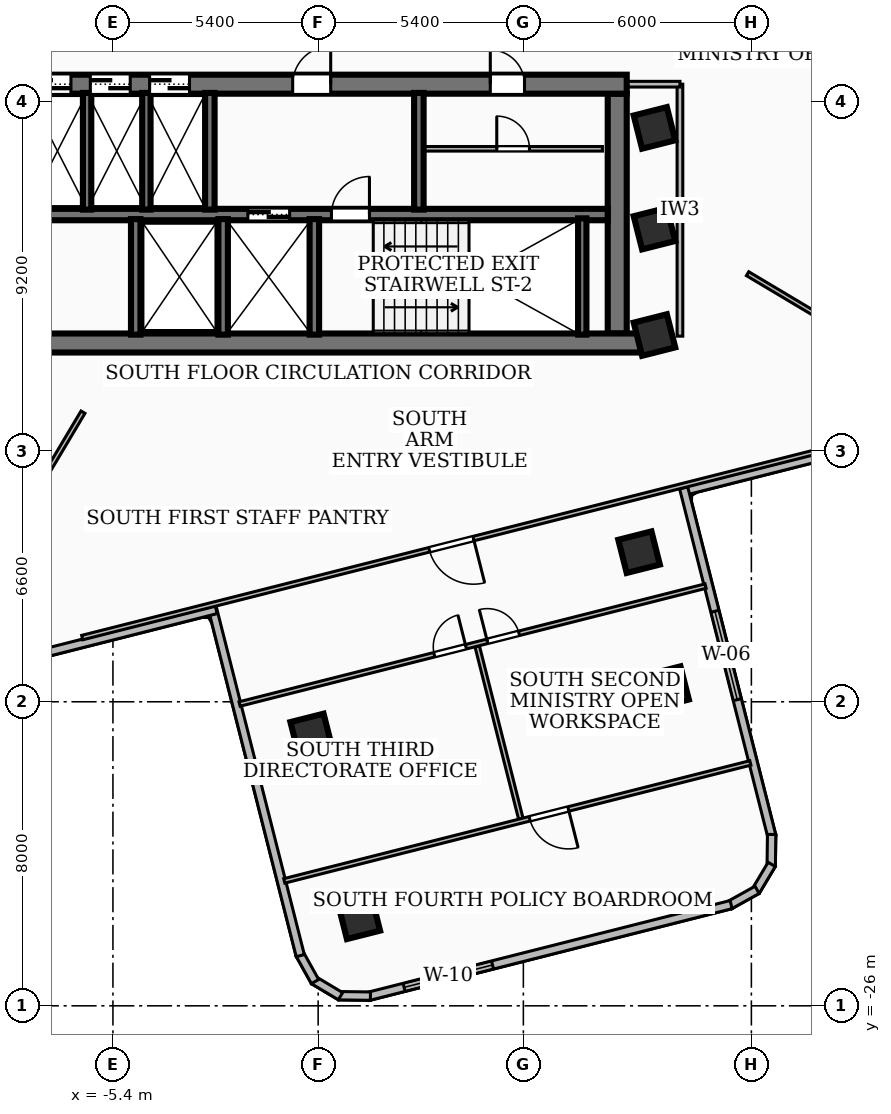
"""IFC4 building model, lengths in metres.
Left out: names, types, materials, properties, quantities, classifications, styles, units other than length and angle.
Written with IfcOpenShell. Run it as: python <this file> out.ifc"""

import sys

from ifc_helpers import new_model, si_unit, direction, frame, frame_2d, origin, origin_2d, place, context, subcontext, project, spatial, rectangle, extrude, element, fill, save


model = new_model("IFC4")
c1 = context("Model", 3, precision=1e-05, world=origin(), true_north=direction((0.0, 1.0)))
c2 = subcontext(c1, "Body", "Model", "MODEL_VIEW")
j1 = project(units=[si_unit("LENGTHUNIT", "METRE"), si_unit("PLANEANGLEUNIT", "RADIAN")], contexts=[c1])
p1 = place(None, origin())
s1 = spatial("IfcSite", under=j1, at=p1, CompositionType="ELEMENT")
p2 = place(p1, origin())
s2 = spatial("IfcBuilding", under=s1, at=p2, CompositionType="ELEMENT")
p3 = place(p2, frame((0.0, 0.0, 130.68)))
s3 = spatial("IfcBuildingStorey", under=s2, at=p3, CompositionType="ELEMENT", Elevation=130.68)
p4 = place(p3, frame((8.78, -8.56, 0.0), z_axis=(0.0, 0.0, 1.0), x_axis=(-1.0, 0.0, 0.0)))
e1 = element("IfcWall", 1, at=p4, inside=s3, PredefinedType="SHEAR", context=c2, shape_type="SweptSolid", body=[
    extrude(rectangle(XDim=17.56, YDim=0.5, at=frame_2d((8.78, 0.0))), origin(), (0.0, 0.0, 1.0), 3.32),
])
p5 = place(p3, frame((-8.12, -1.75, 0.0), z_axis=(0.0, 0.0, 1.0), x_axis=(1.0, 0.0, 0.0)))
e2 = element("IfcWall", 2, at=p5, inside=s3, PredefinedType="SHEAR", context=c2, shape_type="SweptSolid", body=[
    extrude(rectangle(XDim=16.24, YDim=0.5, at=frame_2d((8.12, 0.0))), origin(), (0.0, 0.0, 1.0), 3.32),
])
p6 = place(p5, frame((7.45, 0.0, 0.0)))
e3 = element("IfcOpeningElement", 3, at=p6, cuts=e2, PredefinedType="OPENING", context=c2, shape_type="SweptSolid", body=[
    extrude(rectangle(XDim=1.0, YDim=2.1, at=frame_2d((0.5, 1.05))), frame((0.0, 0.26, 0.0), z_axis=(0.0, -1.0, 0.0), x_axis=(1.0, 0.0, 0.0)), (0.0, 0.0, 1.0), 0.52),
])
p7 = place(p5, frame((12.65, 0.0, 0.0)))
e4 = element("IfcOpeningElement", 4, at=p7, cuts=e2, PredefinedType="OPENING", context=c2, shape_type="SweptSolid", body=[
    extrude(rectangle(XDim=0.9, YDim=2.06, at=frame_2d((0.45, 1.03))), frame((0.0, 0.26, 0.0), z_axis=(0.0, -1.0, 0.0), x_axis=(1.0, 0.0, 0.0)), (0.0, 0.0, 1.0), 0.52),
])
p8 = place(p5, frame((0.565, 0.0, 0.0)))
e5 = element("IfcOpeningElement", 5, at=p8, cuts=e2, PredefinedType="OPENING", context=c2, shape_type="SweptSolid", body=[
    extrude(rectangle(XDim=1.05, YDim=2.15, at=frame_2d((0.525, 1.075))), frame((0.0, 0.26, 0.0), z_axis=(0.0, -1.0, 0.0), x_axis=(1.0, 0.0, 0.0)), (0.0, 0.0, 1.0), 0.52),
])
p9 = place(p5, frame((2.125, 0.0, 0.0)))
e6 = element("IfcOpeningElement", 6, at=p9, cuts=e2, PredefinedType="OPENING", context=c2, shape_type="SweptSolid", body=[
    extrude(rectangle(XDim=1.05, YDim=2.15, at=frame_2d((0.525, 1.075))), frame((0.0, 0.26, 0.0), z_axis=(0.0, -1.0, 0.0), x_axis=(1.0, 0.0, 0.0)), (0.0, 0.0, 1.0), 0.52),
])
p10 = place(p5, frame((3.685, 0.0, 0.0)))
e7 = element("IfcOpeningElement", 7, at=p10, cuts=e2, PredefinedType="OPENING", context=c2, shape_type="SweptSolid", body=[
    extrude(rectangle(XDim=1.05, YDim=2.15, at=frame_2d((0.525, 1.075))), frame((0.0, 0.26, 0.0), z_axis=(0.0, -1.0, 0.0), x_axis=(1.0, 0.0, 0.0)), (0.0, 0.0, 1.0), 0.52),
])
p11 = place(p3, frame((7.87, -2.0, 0.0), z_axis=(0.0, 0.0, 1.0), x_axis=(0.0, -1.0, 0.0)))
e8 = element("IfcWall", 8, at=p11, inside=s3, PredefinedType="SHEAR", context=c2, shape_type="SweptSolid", body=[
    extrude(rectangle(XDim=6.31, YDim=0.5, at=frame_2d((3.155, 0.0))), origin(), (0.0, 0.0, 1.0), 3.32),
])
p12 = place(p3, frame((-7.62, -5.18, 0.0), z_axis=(0.0, 0.0, 1.0), x_axis=(1.0, 0.0, 0.0)))
e9 = element("IfcWall", 9, at=p12, inside=s3, PredefinedType="SOLIDWALL", context=c2, shape_type="SweptSolid", body=[
    extrude(rectangle(XDim=15.24, YDim=0.3, at=frame_2d((7.62, 0.0))), origin(), (0.0, 0.0, 1.0), 3.32),
])
p13 = place(p12, frame((5.77, 0.0, 0.0)))
e10 = element("IfcOpeningElement", 10, at=p13, cuts=e9, PredefinedType="OPENING", context=c2, shape_type="SweptSolid", body=[
    extrude(rectangle(XDim=1.1, YDim=2.15, at=frame_2d((0.55, 1.075))), frame((0.0, 0.16, 0.0), z_axis=(0.0, -1.0, 0.0), x_axis=(1.0, 0.0, 0.0)), (0.0, 0.0, 1.0), 0.32),
])
p14 = place(p12, frame((7.97, 0.0, 0.0)))
e11 = element("IfcOpeningElement", 11, at=p14, cuts=e9, PredefinedType="OPENING", context=c2, shape_type="SweptSolid", body=[
    extrude(rectangle(XDim=1.0, YDim=2.1, at=frame_2d((0.5, 1.05))), frame((0.0, 0.16, 0.0), z_axis=(0.0, -1.0, 0.0), x_axis=(1.0, 0.0, 0.0)), (0.0, 0.0, 1.0), 0.32),
])
p15 = place(p3, frame((6.95, -8.34, 0.0), z_axis=(0.0, 0.0, 1.0), x_axis=(0.0, 1.0, 0.0)))
e12 = element("IfcWall", 12, at=p15, inside=s3, PredefinedType="SOLIDWALL", context=c2, shape_type="SweptSolid", body=[
    extrude(rectangle(XDim=3.06, YDim=0.22, at=frame_2d((1.53, 0.0))), origin(), (0.0, 0.0, 1.0), 3.32),
])
for number, where, z_axis, x_axis in (
    (13, (-0.1, -8.34, 0.0), (0.0, 0.0, 1.0), (0.0, 1.0, 0.0)),
    (14, (-2.5, -8.34, 0.0), (0.0, 0.0, 1.0), (0.0, 1.0, 0.0)),
    (15, (-4.8, -8.34, 0.0), (0.0, 0.0, 1.0), (0.0, 1.0, 0.0)),
):
    element("IfcWall", number, at=place(p3, frame(where, z_axis=z_axis, x_axis=x_axis)), inside=s3, PredefinedType="SOLIDWALL", context=c2, shape_type="SweptSolid", body=[
        extrude(rectangle(XDim=3.04, YDim=0.25, at=frame_2d((1.52, 0.0))), origin(), (0.0, 0.0, 1.0), 3.32),
    ])
for number, where, z_axis, x_axis in (
    (16, (-2.85, -5.05, 0.0), (0.0, 0.0, 1.0), (0.0, 1.0, 0.0)),
    (17, (2.65, -5.05, 0.0), (0.0, 0.0, 1.0), (0.0, 1.0, 0.0)),
):
    element("IfcWall", number, at=place(p3, frame(where, z_axis=z_axis, x_axis=x_axis)), inside=s3, PredefinedType="SOLIDWALL", context=c2, shape_type="SweptSolid", body=[
        extrude(rectangle(XDim=3.07, YDim=0.25, at=frame_2d((1.535, 0.0))), origin(), (0.0, 0.0, 1.0), 3.32),
    ])
for number, where, z_axis, x_axis in (
    (18, (-6.08, -5.05, 0.0), (0.0, 0.0, 1.0), (0.0, 1.0, 0.0)),
    (19, (-4.52, -5.05, 0.0), (0.0, 0.0, 1.0), (0.0, 1.0, 0.0)),
):
    element("IfcWall", number, at=place(p3, frame(where, z_axis=z_axis, x_axis=x_axis)), inside=s3, PredefinedType="SOLIDWALL", context=c2, shape_type="SweptSolid", body=[
        extrude(rectangle(XDim=3.07, YDim=0.22, at=frame_2d((1.535, 0.0))), origin(), (0.0, 0.0, 1.0), 3.32),
    ])
for number, where, z_axis, x_axis in (
    (20, (8.85, -5.55, 0.0), (0.0, 0.0, 1.0), (0.969, 0.245, 0.0)),
    (21, (8.85, -2.9, 0.0), (0.0, 0.0, 1.0), (0.969, 0.245, 0.0)),
    (22, (8.85, -8.35, 0.0), (0.0, 0.0, 1.0), (0.969, 0.245, 0.0)),
    (23, (-0.183, -18.86, 0.0), (0.0, 0.0, 1.0), (0.969, 0.245, 0.0)),
    (24, (8.445, -14.064, 0.0), (0.0, 0.0, 1.0), (0.969, 0.245, 0.0)),
    (25, (1.083, -23.697, 0.0), (0.0, 0.0, 1.0), (0.969, 0.245, 0.0)),
    (26, (9.208, -17.615, 0.0), (0.0, 0.0, 1.0), (0.969, 0.245, 0.0)),
):
    element("IfcColumn", number, at=place(p3, frame(where, z_axis=z_axis, x_axis=x_axis)), inside=s3, PredefinedType="COLUMN", context=c2, shape_type="SweptSolid", body=[
        extrude(rectangle(XDim=0.9, YDim=0.9, at=origin_2d()), origin(), (0.0, 0.0, 1.0), 3.6),
    ])
p16 = place(p3, frame((16.107, -10.82, 0.0), z_axis=(0.0, 0.0, 1.0), x_axis=(-0.969443674581, -0.245314006561, 0.0)))
e27 = element("IfcWall", 27, at=p16, inside=s3, PredefinedType="SOLIDWALL", context=c2, shape_type="SweptSolid", body=[
    extrude(rectangle(XDim=6.759, YDim=0.22, at=frame_2d((3.379, 0.0))), origin(), (0.0, 0.0, 1.0), 3.32),
])
p17 = place(p3, frame((9.618, -12.371, 0.0), z_axis=(0.0, 0.0, 1.0), x_axis=(0.245401293719, -0.969421582719, 0.0)))
e28 = element("IfcWall", 28, at=p17, inside=s3, PredefinedType="SOLIDWALL", context=c2, shape_type="SweptSolid", body=[
    extrude(rectangle(XDim=9.458, YDim=0.22, at=frame_2d((4.729, 0.0))), origin(), (0.0, 0.0, 1.0), 3.32),
])
p18 = place(p17, frame((3.35, 0.0, 0.85)))
e29 = element("IfcOpeningElement", 29, at=p18, cuts=e28, PredefinedType="OPENING", context=c2, shape_type="SweptSolid", body=[
    extrude(rectangle(XDim=2.4, YDim=1.85, at=frame_2d((1.2, 0.925))), frame((0.0, 0.12, 0.0), z_axis=(0.0, -1.0, 0.0), x_axis=(1.0, 0.0, 0.0)), (0.0, 0.0, 1.0), 0.24),
])
p19 = place(p3, frame((11.933, -21.491, 0.0), z_axis=(0.0, 0.0, 1.0), x_axis=(-0.013172159236, -0.999913243347, 0.0)))
e30 = element("IfcWall", 30, at=p19, inside=s3, PredefinedType="SOLIDWALL", context=c2, shape_type="SweptSolid", body=[
    extrude(rectangle(XDim=0.834, YDim=0.22, at=frame_2d((0.417, 0.0))), origin(), (0.0, 0.0, 1.0), 3.32),
])
p20 = place(p3, frame((11.935, -22.279, 0.0), z_axis=(0.0, 0.0, 1.0), x_axis=(-0.513092073782, -0.858333573747, 0.0)))
e31 = element("IfcWall", 31, at=p20, inside=s3, PredefinedType="SOLIDWALL", context=c2, shape_type="SweptSolid", body=[
    extrude(rectangle(XDim=0.819, YDim=0.22, at=frame_2d((0.409, 0.0))), origin(), (0.0, 0.0, 1.0), 3.32),
])
p21 = place(p3, frame((11.55, -22.949, 0.0), z_axis=(0.0, 0.0, 1.0), x_axis=(-0.873646156661, -0.486561807946, 0.0)))
e32 = element("IfcWall", 32, at=p21, inside=s3, PredefinedType="SOLIDWALL", context=c2, shape_type="SweptSolid", body=[
    extrude(rectangle(XDim=0.834, YDim=0.22, at=frame_2d((0.417, 0.0))), origin(), (0.0, 0.0, 1.0), 3.32),
])
p22 = place(p3, frame((10.867, -23.337, 0.0), z_axis=(0.0, 0.0, 1.0), x_axis=(-0.96944386365, -0.245313259386, 0.0)))
e33 = element("IfcWall", 33, at=p22, inside=s3, PredefinedType="SOLIDWALL", context=c2, shape_type="SweptSolid", body=[
    extrude(rectangle(XDim=9.841, YDim=0.22, at=frame_2d((4.92, 0.0))), origin(), (0.0, 0.0, 1.0), 3.32),
])
p23 = place(p22, frame((6.476, 0.0, 0.85)))
e34 = element("IfcOpeningElement", 34, at=p23, cuts=e33, PredefinedType="OPENING", context=c2, shape_type="SweptSolid", body=[
    extrude(rectangle(XDim=2.4, YDim=1.65, at=frame_2d((1.2, 0.825))), frame((0.0, 0.12, 0.0), z_axis=(0.0, -1.0, 0.0), x_axis=(1.0, 0.0, 0.0)), (0.0, 0.0, 1.0), 0.24),
])
p24 = place(p3, frame((1.376, -25.745, 0.0), z_axis=(0.0, 0.0, 1.0), x_axis=(-0.999909345183, 0.013464821393, 0.0)))
e35 = element("IfcWall", 35, at=p24, inside=s3, PredefinedType="SOLIDWALL", context=c2, shape_type="SweptSolid", body=[
    extrude(rectangle(XDim=0.834, YDim=0.22, at=frame_2d((0.417, 0.0))), origin(), (0.0, 0.0, 1.0), 3.32),
])
p25 = place(p3, frame((0.588, -25.747, 0.0), z_axis=(0.0, 0.0, 1.0), x_axis=(-0.858333573747, 0.513092073782, 0.0)))
e36 = element("IfcWall", 36, at=p25, inside=s3, PredefinedType="SOLIDWALL", context=c2, shape_type="SweptSolid", body=[
    extrude(rectangle(XDim=0.819, YDim=0.22, at=frame_2d((0.409, 0.0))), origin(), (0.0, 0.0, 1.0), 3.32),
])
p26 = place(p3, frame((-0.082, -25.362, 0.0), z_axis=(0.0, 0.0, 1.0), x_axis=(-0.487059722252, 0.87336866612, 0.0)))
e37 = element("IfcWall", 37, at=p26, inside=s3, PredefinedType="SOLIDWALL", context=c2, shape_type="SweptSolid", body=[
    extrude(rectangle(XDim=0.833, YDim=0.22, at=frame_2d((0.417, 0.0))), origin(), (0.0, 0.0, 1.0), 3.32),
])
p27 = place(p3, frame((-0.47, -24.68, 0.0), z_axis=(0.0, 0.0, 1.0), x_axis=(-0.245401293719, 0.969421582719, 0.0)))
e38 = element("IfcWall", 38, at=p27, inside=s3, PredefinedType="SOLIDWALL", context=c2, shape_type="SweptSolid", body=[
    extrude(rectangle(XDim=9.458, YDim=0.22, at=frame_2d((4.729, 0.0))), origin(), (0.0, 0.0, 1.0), 2.55),
])
p28 = place(p3, frame((-2.684, -15.574, 0.0), z_axis=(0.0, 0.0, 1.0), x_axis=(-0.969435490349, -0.245346347134, 0.0)))
e39 = element("IfcWall", 39, at=p28, inside=s3, PredefinedType="SOLIDWALL", context=c2, shape_type="SweptSolid", body=[
    extrude(rectangle(XDim=6.538, YDim=0.22, at=frame_2d((3.269, 0.0))), origin(), (0.0, 0.0, 1.0), 2.55),
])
p29 = place(p3, frame((2.8, -3.45, 0.0), z_axis=(0.0, 0.0, 1.0), x_axis=(1.0, 0.0, 0.0)))
e40 = element("IfcWall", 40, at=p29, inside=s3, PredefinedType="PARTITIONING", context=c2, shape_type="SweptSolid", body=[
    extrude(rectangle(XDim=4.68, YDim=0.12, at=frame_2d((2.34, 0.0))), origin(), (0.0, 0.0, 1.0), 3.32),
])
p30 = place(p29, frame((1.9, 0.0, 0.0)))
e41 = element("IfcOpeningElement", 41, at=p30, cuts=e40, PredefinedType="OPENING", context=c2, shape_type="SweptSolid", body=[
    extrude(rectangle(XDim=0.86, YDim=2.04, at=frame_2d((0.43, 1.02))), frame((0.0, 0.07, 0.0), z_axis=(0.0, -1.0, 0.0), x_axis=(1.0, 0.0, 0.0)), (0.0, 0.0, 1.0), 0.14),
])
p31 = place(p3, frame((9.52, -8.38, 0.0), z_axis=(0.0, 0.0, 1.0), x_axis=(0.0, 1.0, 0.0)))
e42 = element("IfcWall", 42, at=p31, inside=s3, PredefinedType="PARTITIONING", context=c2, shape_type="SweptSolid", body=[
    extrude(rectangle(XDim=6.63, YDim=0.15, at=frame_2d((3.315, 0.0))), origin(), (0.0, 0.0, 1.0), 2.55),
])
p32 = place(p3, frame((7.85, -1.75, 0.0), z_axis=(0.0, 0.0, 1.0), x_axis=(1.0, 0.0, 0.0)))
e43 = element("IfcWall", 43, at=p32, inside=s3, PredefinedType="PARTITIONING", context=c2, shape_type="SweptSolid", body=[
    extrude(rectangle(XDim=1.67, YDim=0.15, at=frame_2d((0.835, 0.0))), origin(), (0.0, 0.0, 1.0), 2.55),
])
p33 = place(p3, frame((-6.188, -10.38, 0.0), z_axis=(0.0, 0.0, 1.0), x_axis=(-0.511972353143, -0.859001926434, 0.0)))
e44 = element("IfcWall", 44, at=p33, inside=s3, PredefinedType="PARTITIONING", context=c2, shape_type="SweptSolid", body=[
    extrude(rectangle(XDim=7.59, YDim=0.12, at=frame_2d((3.795, 0.0))), origin(), (0.0, 0.0, 1.0), 2.55),
])
p34 = place(p3, frame((11.3, -6.736, 0.0), z_axis=(0.0, 0.0, 1.0), x_axis=(0.858979599017, -0.512009812868, 0.0)))
e45 = element("IfcWall", 45, at=p34, inside=s3, PredefinedType="PARTITIONING", context=c2, shape_type="SweptSolid", body=[
    extrude(rectangle(XDim=6.519, YDim=0.12, at=frame_2d((3.26, 0.0))), origin(), (0.0, 0.0, 1.0), 3.32),
])
p35 = place(p3, frame((11.342, 13.433, 0.0), z_axis=(0.0, 0.0, 1.0), x_axis=(0.24525085526, -0.969459652587, 0.0)))
e46 = element("IfcWall", 46, at=p35, inside=s3, PredefinedType="PARTITIONING", context=c2, shape_type="SweptSolid", body=[
    extrude(rectangle(XDim=20.261, YDim=0.12, at=frame_2d((10.13, 0.0))), origin(), (0.0, 0.0, 1.0), 2.55),
])
p36 = place(p35, frame((9.64, 0.0, 0.0)))
e47 = element("IfcOpeningElement", 47, at=p36, cuts=e46, PredefinedType="OPENING", context=c2, shape_type="SweptSolid", body=[
    extrude(rectangle(XDim=1.2, YDim=2.1, at=frame_2d((0.6, 1.05))), frame((0.0, 0.07, 0.0), z_axis=(0.0, -1.0, 0.0), x_axis=(1.0, 0.0, 0.0)), (0.0, 0.0, 1.0), 0.14),
])
p37 = place(p3, frame((13.433, -11.342, 0.0), z_axis=(0.0, 0.0, 1.0), x_axis=(-0.969459652587, -0.24525085526, 0.0)))
e48 = element("IfcWall", 48, at=p37, inside=s3, PredefinedType="PARTITIONING", context=c2, shape_type="SweptSolid", body=[
    extrude(rectangle(XDim=20.261, YDim=0.12, at=frame_2d((10.13, 0.0))), origin(), (0.0, 0.0, 1.0), 2.55),
])
p38 = place(p37, frame((9.64, 0.0, 0.0)))
e49 = element("IfcOpeningElement", 49, at=p38, cuts=e48, PredefinedType="OPENING", context=c2, shape_type="SweptSolid", body=[
    extrude(rectangle(XDim=1.2, YDim=2.1, at=frame_2d((0.6, 1.05))), frame((0.0, 0.07, 0.0), z_axis=(0.0, -1.0, 0.0), x_axis=(1.0, 0.0, 0.0)), (0.0, 0.0, 1.0), 0.14),
])
p39 = place(p3, frame((4.185, -16.539, 0.0), z_axis=(0.0, 0.0, 1.0), x_axis=(0.245296506438, -0.969448102752, 0.0)))
e50 = element("IfcWall", 50, at=p39, inside=s3, PredefinedType="PARTITIONING", context=c2, shape_type="SweptSolid", body=[
    extrude(rectangle(XDim=4.68, YDim=0.12, at=frame_2d((2.34, 0.0))), origin(), (0.0, 0.0, 1.0), 2.7),
])
p40 = place(p3, frame((-2.068, -18.059, 0.0), z_axis=(0.0, 0.0, 1.0), x_axis=(0.969446010802, 0.245304773986, 0.0)))
e51 = element("IfcWall", 51, at=p40, inside=s3, PredefinedType="PARTITIONING", context=c2, shape_type="SweptSolid", body=[
    extrude(rectangle(XDim=12.65, YDim=0.12, at=frame_2d((6.325, 0.0))), origin(), (0.0, 0.0, 1.0), 2.55),
])
p41 = place(p40, frame((5.285, 0.0, 0.0)))
e52 = element("IfcOpeningElement", 52, at=p41, cuts=e51, PredefinedType="OPENING", context=c2, shape_type="SweptSolid", body=[
    extrude(rectangle(XDim=0.86, YDim=2.04, at=frame_2d((0.43, 1.02))), frame((0.0, 0.07, 0.0), z_axis=(0.0, -1.0, 0.0), x_axis=(1.0, 0.0, 0.0)), (0.0, 0.0, 1.0), 0.14),
])
p42 = place(p40, frame((6.725, 0.0, 0.0)))
e53 = element("IfcOpeningElement", 53, at=p42, cuts=e51, PredefinedType="OPENING", context=c2, shape_type="SweptSolid", body=[
    extrude(rectangle(XDim=0.86, YDim=2.04, at=frame_2d((0.43, 1.02))), frame((0.0, 0.07, 0.0), z_axis=(0.0, -1.0, 0.0), x_axis=(1.0, 0.0, 0.0)), (0.0, 0.0, 1.0), 0.14),
])
p43 = place(p3, frame((11.373, -19.609, 0.0), z_axis=(0.0, 0.0, 1.0), x_axis=(-0.969432297029, -0.245358964534, 0.0)))
e54 = element("IfcWall", 54, at=p43, inside=s3, PredefinedType="PARTITIONING", context=c2, shape_type="SweptSolid", body=[
    extrude(rectangle(XDim=12.651, YDim=0.12, at=frame_2d((6.325, 0.0))), origin(), (0.0, 0.0, 1.0), 2.55),
])
p44 = place(p43, frame((4.94, 0.0, 0.0)))
e55 = element("IfcOpeningElement", 55, at=p44, cuts=e54, PredefinedType="OPENING", context=c2, shape_type="SweptSolid", body=[
    extrude(rectangle(XDim=1.05, YDim=2.08, at=frame_2d((0.525, 1.04))), frame((0.0, 0.07, 0.0), z_axis=(0.0, -1.0, 0.0), x_axis=(1.0, 0.0, 0.0)), (0.0, 0.0, 1.0), 0.14),
])
p45 = place(p18, origin())
e56 = element("IfcWindow", 56, at=p45, inside=s3, PartitioningType="SINGLE_PANEL", PredefinedType="WINDOW", context=c2, shape_type="SweptSolid", body=[
    extrude(rectangle(XDim=2.4, YDim=1.85, at=frame_2d((1.2, 0.925))), frame((0.0, 0.03, 0.0), z_axis=(0.0, -1.0, 0.0), x_axis=(1.0, 0.0, 0.0)), (0.0, 0.0, 1.0), 0.06),
])
fill(e29, e56)
p46 = place(p23, origin())
e57 = element("IfcWindow", 57, at=p46, inside=s3, PartitioningType="SINGLE_PANEL", PredefinedType="WINDOW", context=c2, shape_type="SweptSolid", body=[
    extrude(rectangle(XDim=2.4, YDim=1.65, at=frame_2d((1.2, 0.825))), frame((0.0, 0.03, 0.0), z_axis=(0.0, -1.0, 0.0), x_axis=(1.0, 0.0, 0.0)), (0.0, 0.0, 1.0), 0.06),
])
fill(e34, e57)
p47 = place(p6, origin())
e58 = element("IfcDoor", 58, at=p47, inside=s3, OperationType="SINGLE_SWING_RIGHT", PredefinedType="DOOR", context=c2, shape_type="SweptSolid", body=[
    extrude(rectangle(XDim=1.0, YDim=2.1, at=frame_2d((0.5, 1.05))), frame((0.0, 0.025, 0.0), z_axis=(0.0, -1.0, 0.0), x_axis=(1.0, 0.0, 0.0)), (0.0, 0.0, 1.0), 0.05),
])
fill(e3, e58)
p48 = place(p13, origin())
e59 = element("IfcDoor", 59, at=p48, inside=s3, OperationType="DOUBLE_DOOR_SLIDING", PredefinedType="DOOR", context=c2, shape_type="SweptSolid", body=[
    extrude(rectangle(XDim=1.1, YDim=2.15, at=frame_2d((0.55, 1.075))), frame((0.0, 0.025, 0.0), z_axis=(0.0, -1.0, 0.0), x_axis=(1.0, 0.0, 0.0)), (0.0, 0.0, 1.0), 0.05),
])
fill(e10, e59)
p49 = place(p14, origin())
e60 = element("IfcDoor", 60, at=p49, inside=s3, OperationType="SINGLE_SWING_RIGHT", PredefinedType="DOOR", context=c2, shape_type="SweptSolid", body=[
    extrude(rectangle(XDim=1.0, YDim=2.1, at=frame_2d((0.5, 1.05))), frame((0.0, 0.025, 0.0), z_axis=(0.0, -1.0, 0.0), x_axis=(1.0, 0.0, 0.0)), (0.0, 0.0, 1.0), 0.05),
])
fill(e11, e60)
p50 = place(p7, origin())
e61 = element("IfcDoor", 61, at=p50, inside=s3, OperationType="SINGLE_SWING_LEFT", PredefinedType="DOOR", context=c2, shape_type="SweptSolid", body=[
    extrude(rectangle(XDim=0.9, YDim=2.06, at=frame_2d((0.45, 1.03))), frame((0.0, 0.025, 0.0), z_axis=(0.0, -1.0, 0.0), x_axis=(1.0, 0.0, 0.0)), (0.0, 0.0, 1.0), 0.05),
])
fill(e4, e61)
p51 = place(p8, origin())
e62 = element("IfcDoor", 62, at=p51, inside=s3, OperationType="DOUBLE_DOOR_SLIDING", PredefinedType="DOOR", context=c2, shape_type="SweptSolid", body=[
    extrude(rectangle(XDim=1.05, YDim=2.15, at=frame_2d((0.525, 1.075))), frame((0.0, 0.025, 0.0), z_axis=(0.0, -1.0, 0.0), x_axis=(1.0, 0.0, 0.0)), (0.0, 0.0, 1.0), 0.05),
])
fill(e5, e62)
p52 = place(p9, origin())
e63 = element("IfcDoor", 63, at=p52, inside=s3, OperationType="DOUBLE_DOOR_SLIDING", PredefinedType="DOOR", context=c2, shape_type="SweptSolid", body=[
    extrude(rectangle(XDim=1.05, YDim=2.15, at=frame_2d((0.525, 1.075))), frame((0.0, 0.025, 0.0), z_axis=(0.0, -1.0, 0.0), x_axis=(1.0, 0.0, 0.0)), (0.0, 0.0, 1.0), 0.05),
])
fill(e6, e63)
p53 = place(p10, origin())
e64 = element("IfcDoor", 64, at=p53, inside=s3, OperationType="DOUBLE_DOOR_SLIDING", PredefinedType="DOOR", context=c2, shape_type="SweptSolid", body=[
    extrude(rectangle(XDim=1.05, YDim=2.15, at=frame_2d((0.525, 1.075))), frame((0.0, 0.025, 0.0), z_axis=(0.0, -1.0, 0.0), x_axis=(1.0, 0.0, 0.0)), (0.0, 0.0, 1.0), 0.05),
])
fill(e7, e64)
p54 = place(p30, origin())
e65 = element("IfcDoor", 65, at=p54, inside=s3, OperationType="SINGLE_SWING_LEFT", PredefinedType="DOOR", context=c2, shape_type="SweptSolid", body=[
    extrude(rectangle(XDim=0.86, YDim=2.04, at=frame_2d((0.43, 1.02))), frame((0.0, 0.025, 0.0), z_axis=(0.0, -1.0, 0.0), x_axis=(1.0, 0.0, 0.0)), (0.0, 0.0, 1.0), 0.05),
])
fill(e41, e65)
p55 = place(p38, origin())
e66 = element("IfcDoor", 66, at=p55, inside=s3, OperationType="SINGLE_SWING_LEFT", PredefinedType="DOOR", context=c2, shape_type="SweptSolid", body=[
    extrude(rectangle(XDim=1.2, YDim=2.1, at=frame_2d((0.6, 1.05))), frame((0.0, 0.025, 0.0), z_axis=(0.0, -1.0, 0.0), x_axis=(1.0, 0.0, 0.0)), (0.0, 0.0, 1.0), 0.05),
])
fill(e49, e66)
p56 = place(p41, origin())
e67 = element("IfcDoor", 67, at=p56, inside=s3, OperationType="SINGLE_SWING_RIGHT", PredefinedType="DOOR", context=c2, shape_type="SweptSolid", body=[
    extrude(rectangle(XDim=0.86, YDim=2.04, at=frame_2d((0.43, 1.02))), frame((0.0, 0.025, 0.0), z_axis=(0.0, -1.0, 0.0), x_axis=(1.0, 0.0, 0.0)), (0.0, 0.0, 1.0), 0.05),
])
fill(e52, e67)
p57 = place(p42, origin())
e68 = element("IfcDoor", 68, at=p57, inside=s3, OperationType="SINGLE_SWING_LEFT", PredefinedType="DOOR", context=c2, shape_type="SweptSolid", body=[
    extrude(rectangle(XDim=0.86, YDim=2.04, at=frame_2d((0.43, 1.02))), frame((0.0, 0.025, 0.0), z_axis=(0.0, -1.0, 0.0), x_axis=(1.0, 0.0, 0.0)), (0.0, 0.0, 1.0), 0.05),
])
fill(e53, e68)
p58 = place(p44, origin())
e69 = element("IfcDoor", 69, at=p58, inside=s3, OperationType="SINGLE_SWING_LEFT", PredefinedType="DOOR", context=c2, shape_type="SweptSolid", body=[
    extrude(rectangle(XDim=1.05, YDim=2.08, at=frame_2d((0.525, 1.04))), frame((0.0, 0.025, 0.0), z_axis=(0.0, -1.0, 0.0), x_axis=(1.0, 0.0, 0.0)), (0.0, 0.0, 1.0), 0.05),
])
fill(e55, e69)
save(model, sys.argv[1])
